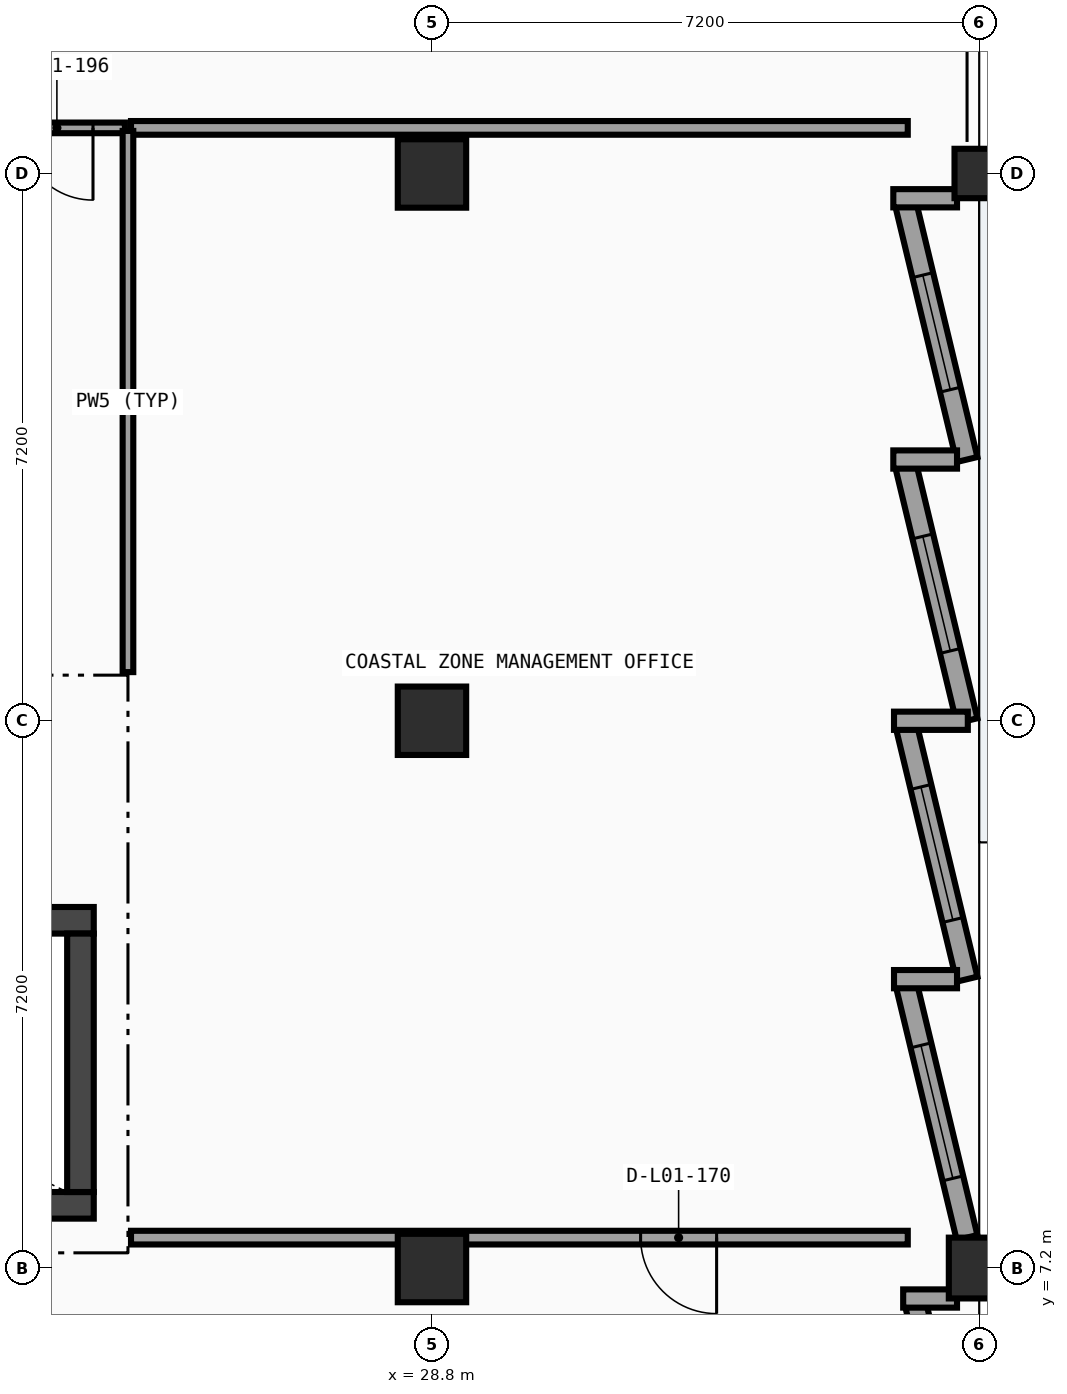
"""IFC4 building model, lengths in metres.
Left out: names, types, materials, properties, quantities, classifications, styles, units other than length and angle.
Written with IfcOpenShell. Run it as: python <this file> out.ifc"""

import sys

from ifc_helpers import new_model, si_unit, direction, frame, frame_2d, origin, origin_2d, place, context, subcontext, project, spatial, rectangle, extrude, element, fill, save


model = new_model("IFC4")
c1 = context("Model", 3, precision=1e-05, world=origin(), true_north=direction((0.0, 1.0)))
c2 = subcontext(c1, "Body", "Model", "MODEL_VIEW")
j1 = project(units=[si_unit("LENGTHUNIT", "METRE"), si_unit("PLANEANGLEUNIT", "RADIAN")], contexts=[c1])
p1 = place(None, origin())
s1 = spatial("IfcSite", under=j1, at=p1, CompositionType="ELEMENT")
p2 = place(p1, origin())
s2 = spatial("IfcBuilding", under=s1, at=p2, CompositionType="ELEMENT")
p3 = place(p2, frame((0.0, 0.0, 5.4)))
s3 = spatial("IfcBuildingStorey", under=s2, at=p3, CompositionType="ELEMENT", Elevation=5.4)
for number, where, z_axis, x_axis in (
    (1, (28.8, 7.2, 0.0), (0.0, 0.0, 1.0), (1.0, 0.0, 0.0)),
    (2, (28.8, 14.4, 0.0), (0.0, 0.0, 1.0), (1.0, 0.0, 0.0)),
    (3, (28.8, 21.6, 0.0), (0.0, 0.0, 1.0), (1.0, 0.0, 0.0)),
):
    element("IfcColumn", number, at=place(p3, frame(where, z_axis=z_axis, x_axis=x_axis)), inside=s3, PredefinedType="COLUMN", context=c2, shape_type="SweptSolid", body=[
        extrude(rectangle(XDim=0.9, YDim=0.9, at=origin_2d()), origin(), (0.0, 0.0, 1.0), 4.8),
    ])
p4 = place(p3, frame((36.0, 7.2, 0.0), z_axis=(0.0, 0.0, 1.0), x_axis=(1.0, 0.0, 0.0)))
e4 = element("IfcColumn", 4, at=p4, inside=s3, PredefinedType="COLUMN", context=c2, shape_type="SweptSolid", body=[
    extrude(rectangle(XDim=0.8, YDim=0.8, at=origin_2d()), origin(), (0.0, 0.0, 1.0), 4.8),
])
p5 = place(p3, frame((36.0, 21.6, 0.0), z_axis=(0.0, 0.0, 1.0), x_axis=(1.0, 0.0, 0.0)))
e5 = element("IfcColumn", 5, at=p5, inside=s3, PredefinedType="COLUMN", context=c2, shape_type="SweptSolid", body=[
    extrude(rectangle(XDim=0.65, YDim=0.65, at=origin_2d()), origin(), (0.0, 0.0, 1.0), 4.8),
])
p6 = place(p3, frame((35.037, 21.182, 0.0), z_axis=(0.0, 0.0, 1.0), x_axis=(0.233440062358, -0.972371193159, 0.0)))
e6 = element("IfcWall", 6, at=p6, inside=s3, PredefinedType="SOLIDWALL", context=c2, shape_type="SweptSolid", body=[
    extrude(rectangle(XDim=3.44, YDim=0.28, at=frame_2d((1.72, 0.0))), origin(), (0.0, 0.0, 1.0), 3.201),
])
p7 = place(p6, frame((0.945, 0.0, 0.8)))
e7 = element("IfcOpeningElement", 7, at=p7, cuts=e6, PredefinedType="OPENING", context=c2, shape_type="SweptSolid", body=[
    extrude(rectangle(XDim=1.55, YDim=1.8, at=frame_2d((0.775, 0.9))), frame((0.0, 0.15, 0.0), z_axis=(0.0, -1.0, 0.0), x_axis=(1.0, 0.0, 0.0)), (0.0, 0.0, 1.0), 0.3),
])
p8 = place(p3, frame((34.87, 21.274, 0.0), z_axis=(0.0, 0.0, 1.0), x_axis=(1.0, 0.0, 0.0)))
e8 = element("IfcWall", 8, at=p8, inside=s3, PredefinedType="SOLIDWALL", context=c2, shape_type="SweptSolid", body=[
    extrude(rectangle(XDim=0.838, YDim=0.24, at=frame_2d((0.419, 0.0))), origin(), (0.0, 0.0, 1.0), 3.201),
])
p9 = place(p3, frame((35.037, 17.745, 0.0), z_axis=(0.0, 0.0, 1.0), x_axis=(0.233440062358, -0.972371193159, 0.0)))
e9 = element("IfcWall", 9, at=p9, inside=s3, PredefinedType="SOLIDWALL", context=c2, shape_type="SweptSolid", body=[
    extrude(rectangle(XDim=3.44, YDim=0.28, at=frame_2d((1.72, 0.0))), origin(), (0.0, 0.0, 1.0), 3.201),
])
p10 = place(p9, frame((0.945, 0.0, 0.8)))
e10 = element("IfcOpeningElement", 10, at=p10, cuts=e9, PredefinedType="OPENING", context=c2, shape_type="SweptSolid", body=[
    extrude(rectangle(XDim=1.55, YDim=1.8, at=frame_2d((0.775, 0.9))), frame((0.0, 0.15, 0.0), z_axis=(0.0, -1.0, 0.0), x_axis=(1.0, 0.0, 0.0)), (0.0, 0.0, 1.0), 0.3),
])
p11 = place(p3, frame((34.87, 17.837, 0.0), z_axis=(0.0, 0.0, 1.0), x_axis=(1.0, 0.0, 0.0)))
e11 = element("IfcWall", 11, at=p11, inside=s3, PredefinedType="SOLIDWALL", context=c2, shape_type="SweptSolid", body=[
    extrude(rectangle(XDim=0.838, YDim=0.24, at=frame_2d((0.419, 0.0))), origin(), (0.0, 0.0, 1.0), 3.201),
])
p12 = place(p3, frame((35.046, 14.308, 0.0), z_axis=(0.0, 0.0, 1.0), x_axis=(0.233438110442, -0.97237166176, 0.0)))
e12 = element("IfcWall", 12, at=p12, inside=s3, PredefinedType="SOLIDWALL", context=c2, shape_type="SweptSolid", body=[
    extrude(rectangle(XDim=3.401, YDim=0.28, at=frame_2d((1.701, 0.0))), origin(), (0.0, 0.0, 1.0), 3.201),
])
p13 = place(p12, frame((0.801, 0.0, 0.8)))
e13 = element("IfcOpeningElement", 13, at=p13, cuts=e12, PredefinedType="OPENING", context=c2, shape_type="SweptSolid", body=[
    extrude(rectangle(XDim=1.8, YDim=1.85, at=frame_2d((0.9, 0.925))), frame((0.0, 0.15, 0.0), z_axis=(0.0, -1.0, 0.0), x_axis=(1.0, 0.0, 0.0)), (0.0, 0.0, 1.0), 0.3),
])
p14 = place(p3, frame((34.879, 14.4, 0.0), z_axis=(0.0, 0.0, 1.0), x_axis=(1.0, 0.0, 0.0)))
e14 = element("IfcWall", 14, at=p14, inside=s3, PredefinedType="SOLIDWALL", context=c2, shape_type="SweptSolid", body=[
    extrude(rectangle(XDim=0.971, YDim=0.24, at=frame_2d((0.486, 0.0))), origin(), (0.0, 0.0, 1.0), 3.201),
])
p15 = place(p3, frame((35.046, 10.908, 0.0), z_axis=(0.0, 0.0, 1.0), x_axis=(0.233438110442, -0.97237166176, 0.0)))
e15 = element("IfcWall", 15, at=p15, inside=s3, PredefinedType="SOLIDWALL", context=c2, shape_type="SweptSolid", body=[
    extrude(rectangle(XDim=3.401, YDim=0.28, at=frame_2d((1.701, 0.0))), origin(), (0.0, 0.0, 1.0), 3.201),
])
p16 = place(p15, frame((0.801, 0.0, 0.8)))
e16 = element("IfcOpeningElement", 16, at=p16, cuts=e15, PredefinedType="OPENING", context=c2, shape_type="SweptSolid", body=[
    extrude(rectangle(XDim=1.8, YDim=1.85, at=frame_2d((0.9, 0.925))), frame((0.0, 0.15, 0.0), z_axis=(0.0, -1.0, 0.0), x_axis=(1.0, 0.0, 0.0)), (0.0, 0.0, 1.0), 0.3),
])
p17 = place(p3, frame((34.879, 11.0, 0.0), z_axis=(0.0, 0.0, 1.0), x_axis=(1.0, 0.0, 0.0)))
e17 = element("IfcWall", 17, at=p17, inside=s3, PredefinedType="SOLIDWALL", context=c2, shape_type="SweptSolid", body=[
    extrude(rectangle(XDim=0.829, YDim=0.24, at=frame_2d((0.415, 0.0))), origin(), (0.0, 0.0, 1.0), 3.201),
])
p18 = place(p3, frame((35.167, 6.707, 0.0), z_axis=(0.0, 0.0, 1.0), x_axis=(0.233501033921, -0.972356553512, 0.0)))
e18 = element("IfcWall", 18, at=p18, inside=s3, PredefinedType="SOLIDWALL", context=c2, shape_type="SweptSolid", body=[
    extrude(rectangle(XDim=2.884, YDim=0.28, at=frame_2d((1.442, 0.0))), origin(), (0.0, 0.0, 1.0), 3.976),
])
p19 = place(p18, frame((0.542, 0.0, 0.8)))
e19 = element("IfcOpeningElement", 19, at=p19, cuts=e18, PredefinedType="OPENING", context=c2, shape_type="SweptSolid", body=[
    extrude(rectangle(XDim=1.8, YDim=1.85, at=frame_2d((0.9, 0.925))), frame((0.0, 0.15, 0.0), z_axis=(0.0, -1.0, 0.0), x_axis=(1.0, 0.0, 0.0)), (0.0, 0.0, 1.0), 0.3),
])
p20 = place(p3, frame((35.0, 6.799, 0.0), z_axis=(0.0, 0.0, 1.0), x_axis=(1.0, 0.0, 0.0)))
e20 = element("IfcWall", 20, at=p20, inside=s3, PredefinedType="SOLIDWALL", context=c2, shape_type="SweptSolid", body=[
    extrude(rectangle(XDim=0.708, YDim=0.24, at=frame_2d((0.354, 0.0))), origin(), (0.0, 0.0, 1.0), 4.52),
])
for number, where, z_axis, x_axis in (
    (21, (15.05, 8.025, 0.0), (0.0, 0.0, 1.0), (1.0, 0.0, 0.0)),
    (22, (24.35, 11.775, 0.0), (0.0, 0.0, 1.0), (-1.0, 0.0, 0.0)),
):
    element("IfcWall", number, at=place(p3, frame(where, z_axis=z_axis, x_axis=x_axis)), inside=s3, PredefinedType="SHEAR", context=c2, shape_type="SweptSolid", body=[
        extrude(rectangle(XDim=9.3, YDim=0.35, at=frame_2d((4.65, 0.0))), origin(), (0.0, 0.0, 1.0), 4.52),
    ])
p21 = place(p3, frame((24.175, 8.2, 0.0), z_axis=(0.0, 0.0, 1.0), x_axis=(0.0, 1.0, 0.0)))
e23 = element("IfcWall", 23, at=p21, inside=s3, PredefinedType="SHEAR", context=c2, shape_type="SweptSolid", body=[
    extrude(rectangle(XDim=3.4, YDim=0.35, at=frame_2d((1.7, 0.0))), origin(), (0.0, 0.0, 1.0), 4.52),
])
p22 = place(p3, frame((24.84, 22.2, 0.0), z_axis=(0.0, 0.0, 1.0), x_axis=(1.0, 0.0, 0.0)))
e24 = element("IfcWall", 24, at=p22, inside=s3, PredefinedType="PARTITIONING", context=c2, shape_type="SweptSolid", body=[
    extrude(rectangle(XDim=10.22, YDim=0.18, at=frame_2d((5.11, 0.0))), origin(), (0.0, 0.0, 1.0), 3.801),
])
p23 = place(p3, frame((21.84, 22.2, 0.0), z_axis=(0.0, 0.0, 1.0), x_axis=(1.0, 0.0, 0.0)))
e25 = element("IfcWall", 25, at=p23, inside=s3, PredefinedType="PARTITIONING", context=c2, shape_type="SweptSolid", body=[
    extrude(rectangle(XDim=2.92, YDim=0.14, at=frame_2d((1.46, 0.0))), origin(), (0.0, 0.0, 1.0), 4.52),
])
p24 = place(p23, frame((1.55, 0.0, 0.0)))
e26 = element("IfcOpeningElement", 26, at=p24, cuts=e25, PredefinedType="OPENING", context=c2, shape_type="SweptSolid", body=[
    extrude(rectangle(XDim=0.95, YDim=2.08, at=frame_2d((0.475, 1.04))), frame((0.0, 0.08, 0.0), z_axis=(0.0, -1.0, 0.0), x_axis=(1.0, 0.0, 0.0)), (0.0, 0.0, 1.0), 0.16),
])
p25 = place(p3, frame((24.84, 7.6, 0.0), z_axis=(0.0, 0.0, 1.0), x_axis=(1.0, 0.0, 0.0)))
e27 = element("IfcWall", 27, at=p25, inside=s3, PredefinedType="PARTITIONING", context=c2, shape_type="SweptSolid", body=[
    extrude(rectangle(XDim=10.22, YDim=0.18, at=frame_2d((5.11, 0.0))), origin(), (0.0, 0.0, 1.0), 3.801),
])
p26 = place(p25, frame((6.705, 0.0, 0.0)))
e28 = element("IfcOpeningElement", 28, at=p26, cuts=e27, PredefinedType="OPENING", context=c2, shape_type="SweptSolid", body=[
    extrude(rectangle(XDim=1.0, YDim=2.1, at=frame_2d((0.5, 1.05))), frame((0.0, 0.1, 0.0), z_axis=(0.0, -1.0, 0.0), x_axis=(1.0, 0.0, 0.0)), (0.0, 0.0, 1.0), 0.2),
])
p27 = place(p3, frame((24.8, 15.04, 0.0), z_axis=(0.0, 0.0, 1.0), x_axis=(0.0, 1.0, 0.0)))
e29 = element("IfcWall", 29, at=p27, inside=s3, PredefinedType="PARTITIONING", context=c2, shape_type="SweptSolid", body=[
    extrude(rectangle(XDim=7.12, YDim=0.14, at=frame_2d((3.56, 0.0))), origin(), (0.0, 0.0, 1.0), 3.889),
])
p28 = place(p7, origin())
e30 = element("IfcWindow", 30, at=p28, inside=s3, PartitioningType="SINGLE_PANEL", PredefinedType="WINDOW", context=c2, shape_type="SweptSolid", body=[
    extrude(rectangle(XDim=1.55, YDim=1.8, at=frame_2d((0.775, 0.9))), frame((0.0, 0.03, 0.0), z_axis=(0.0, -1.0, 0.0), x_axis=(1.0, 0.0, 0.0)), (0.0, 0.0, 1.0), 0.06),
])
fill(e7, e30)
p29 = place(p10, origin())
e31 = element("IfcWindow", 31, at=p29, inside=s3, PartitioningType="SINGLE_PANEL", PredefinedType="WINDOW", context=c2, shape_type="SweptSolid", body=[
    extrude(rectangle(XDim=1.55, YDim=1.8, at=frame_2d((0.775, 0.9))), frame((0.0, 0.03, 0.0), z_axis=(0.0, -1.0, 0.0), x_axis=(1.0, 0.0, 0.0)), (0.0, 0.0, 1.0), 0.06),
])
fill(e10, e31)
p30 = place(p13, origin())
e32 = element("IfcWindow", 32, at=p30, inside=s3, PartitioningType="SINGLE_PANEL", PredefinedType="WINDOW", context=c2, shape_type="SweptSolid", body=[
    extrude(rectangle(XDim=1.8, YDim=1.85, at=frame_2d((0.9, 0.925))), frame((0.0, 0.03, 0.0), z_axis=(0.0, -1.0, 0.0), x_axis=(1.0, 0.0, 0.0)), (0.0, 0.0, 1.0), 0.06),
])
fill(e13, e32)
p31 = place(p16, origin())
e33 = element("IfcWindow", 33, at=p31, inside=s3, PartitioningType="SINGLE_PANEL", PredefinedType="WINDOW", context=c2, shape_type="SweptSolid", body=[
    extrude(rectangle(XDim=1.8, YDim=1.85, at=frame_2d((0.9, 0.925))), frame((0.0, 0.03, 0.0), z_axis=(0.0, -1.0, 0.0), x_axis=(1.0, 0.0, 0.0)), (0.0, 0.0, 1.0), 0.06),
])
fill(e16, e33)
p32 = place(p26, origin())
e34 = element("IfcDoor", 34, at=p32, inside=s3, OperationType="SINGLE_SWING_RIGHT", PredefinedType="DOOR", context=c2, shape_type="SweptSolid", body=[
    extrude(rectangle(XDim=1.0, YDim=2.1, at=frame_2d((0.5, 1.05))), frame((0.0, 0.025, 0.0), z_axis=(0.0, -1.0, 0.0), x_axis=(1.0, 0.0, 0.0)), (0.0, 0.0, 1.0), 0.05),
])
fill(e28, e34)
p33 = place(p24, origin())
e35 = element("IfcDoor", 35, at=p33, inside=s3, OperationType="SINGLE_SWING_RIGHT", PredefinedType="DOOR", context=c2, shape_type="SweptSolid", body=[
    extrude(rectangle(XDim=0.95, YDim=2.08, at=frame_2d((0.475, 1.04))), frame((0.0, 0.025, 0.0), z_axis=(0.0, -1.0, 0.0), x_axis=(1.0, 0.0, 0.0)), (0.0, 0.0, 1.0), 0.05),
])
fill(e26, e35)
save(model, sys.argv[1])
